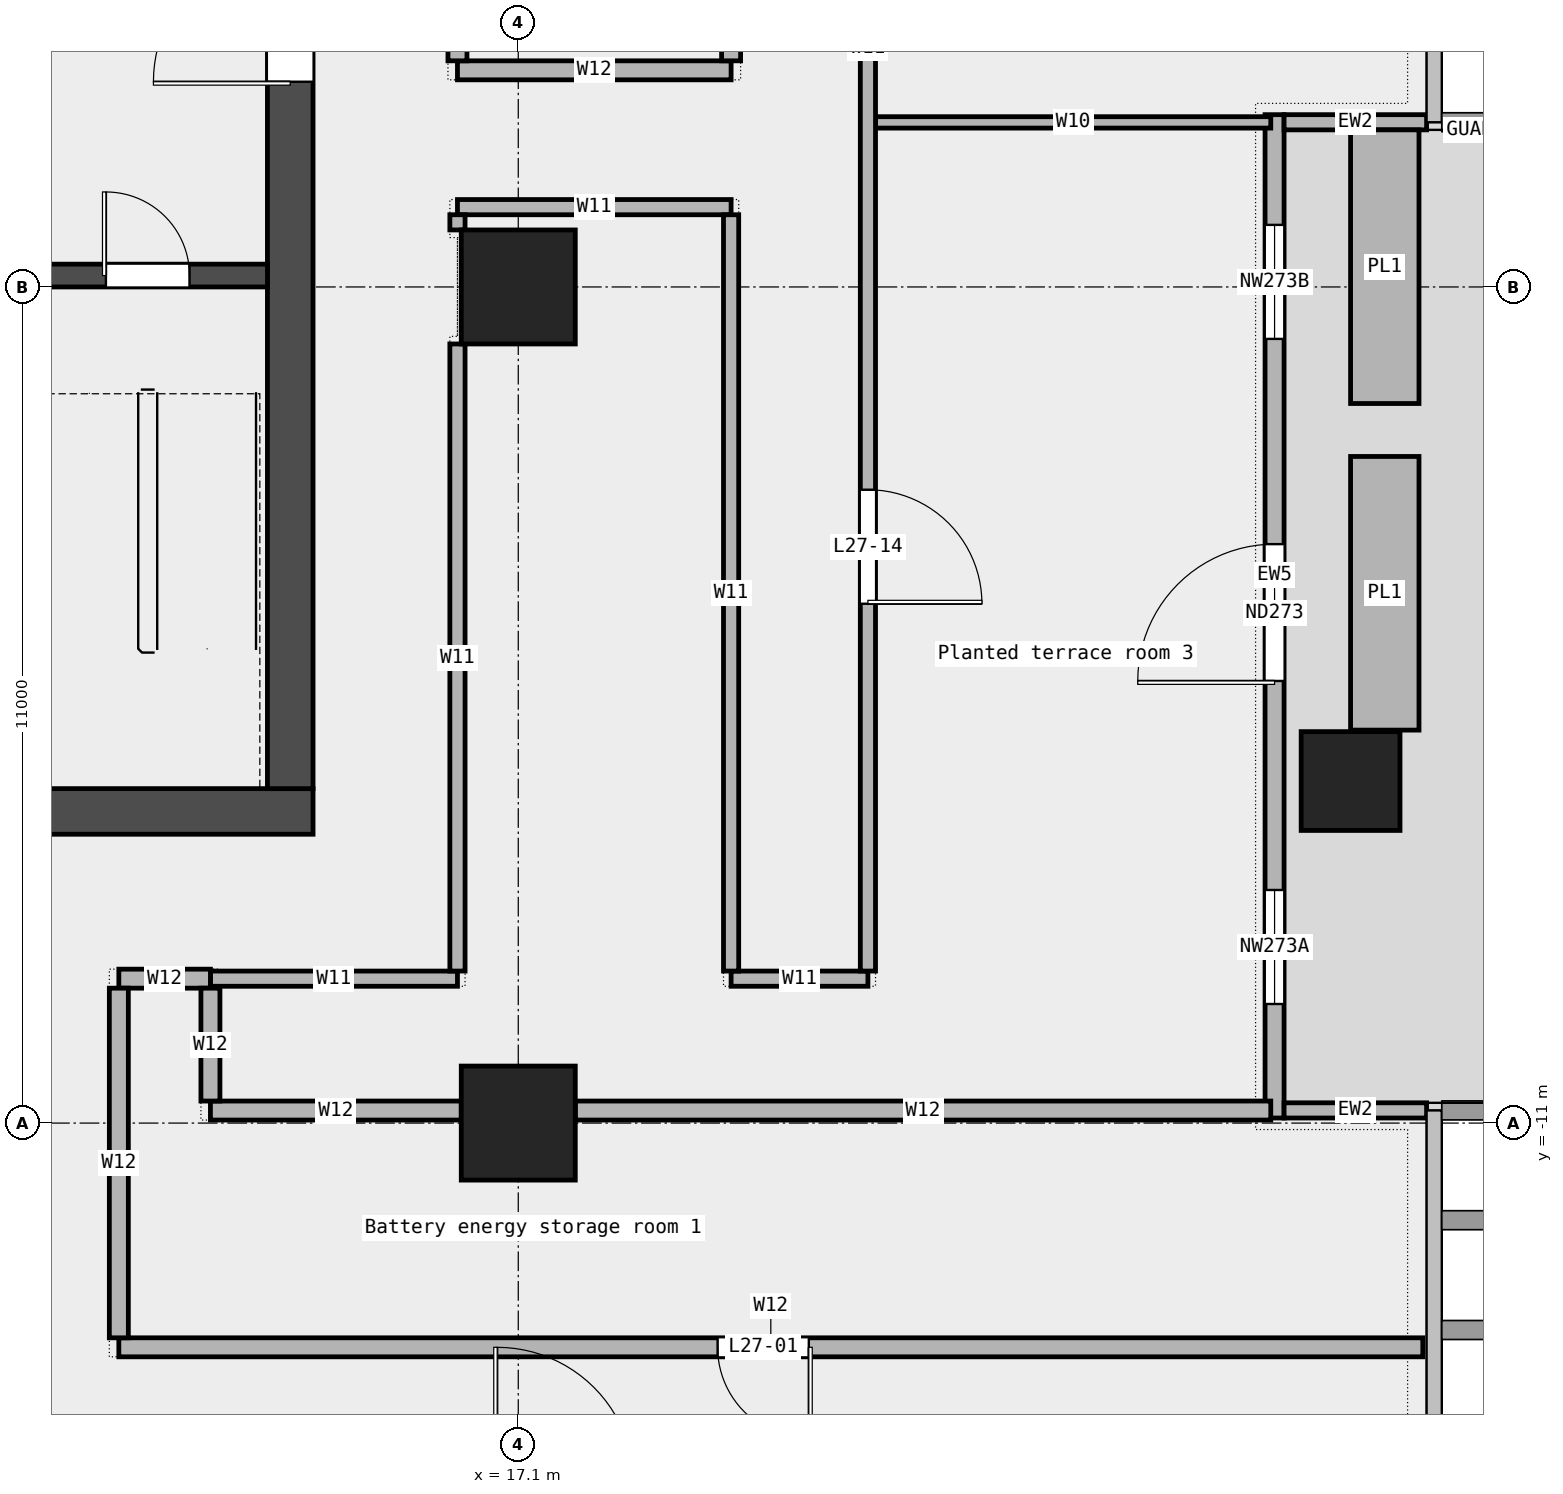
"""IFC4 building model, lengths in metres.
Left out: names, types, materials, properties, quantities, classifications, styles, units other than length and angle.
Written with IfcOpenShell. Run it as: python <this file> out.ifc"""

import sys

from ifc_helpers import new_model, si_unit, direction, frame, frame_2d, origin, origin_2d, place, context, subcontext, project, spatial, rectangle, extrude, element, fill, save


model = new_model("IFC4")
c1 = context("Model", 3, precision=1e-05, world=origin(), true_north=direction((0.0, 1.0)))
c2 = subcontext(c1, "Body", "Model", "MODEL_VIEW")
j1 = project(units=[si_unit("LENGTHUNIT", "METRE"), si_unit("PLANEANGLEUNIT", "RADIAN")], contexts=[c1])
p1 = place(None, origin())
s1 = spatial("IfcSite", under=j1, at=p1, CompositionType="ELEMENT")
p2 = place(p1, origin())
s2 = spatial("IfcBuilding", under=s1, at=p2, CompositionType="ELEMENT")
p3 = place(p2, frame((0.0, 0.0, 135.1)))
s3 = spatial("IfcBuildingStorey", under=s2, at=p3, CompositionType="ELEMENT", Elevation=135.1)
p4 = place(p3, frame((28.05, -6.5, 0.0), z_axis=(0.0, 0.0, 1.0), x_axis=(1.0, 0.0, 0.0)))
e1 = element("IfcColumn", 1, at=p4, inside=s3, PredefinedType="COLUMN", context=c2, shape_type="SweptSolid", body=[
    extrude(rectangle(XDim=1.3, YDim=1.3, at=origin_2d()), origin(), (0.0, 0.0, 1.0), 4.05),
])
for number, where, z_axis, x_axis in (
    (2, (17.1, -11.0, 0.0), (0.0, 0.0, 1.0), (1.0, 0.0, 0.0)),
    (3, (17.1, 0.0, 0.0), (0.0, 0.0, 1.0), (1.0, 0.0, 0.0)),
):
    element("IfcColumn", number, at=place(p3, frame(where, z_axis=z_axis, x_axis=x_axis)), inside=s3, PredefinedType="COLUMN", context=c2, shape_type="SweptSolid", body=[
        extrude(rectangle(XDim=1.5, YDim=1.5, at=origin_2d()), origin(), (0.0, 0.0, 1.0), 4.05),
    ])
p5 = place(p3, frame((27.05, -10.933, 0.0), z_axis=(0.0, 0.0, 1.0), x_axis=(0.0, 1.0, 0.0)))
e4 = element("IfcWall", 4, at=p5, inside=s3, PredefinedType="STANDARD", context=c2, shape_type="SweptSolid", body=[
    extrude(rectangle(XDim=13.2, YDim=0.25, at=frame_2d((6.6, 0.0))), origin(), (0.0, 0.0, 1.0), 4.05),
])
p6 = place(p5, frame((1.5, 0.0, 0.45)))
e5 = element("IfcOpeningElement", 5, at=p6, cuts=e4, PredefinedType="OPENING", context=c2, shape_type="SweptSolid", body=[
    extrude(rectangle(XDim=1.5, YDim=3.0, at=frame_2d((0.75, 1.5))), frame((0.0, 0.137, 0.0), z_axis=(0.0, -1.0, 0.0), x_axis=(1.0, 0.0, 0.0)), (0.0, 0.0, 1.0), 0.274),
])
p7 = place(p5, frame((5.75, 0.0, 0.0)))
e6 = element("IfcOpeningElement", 6, at=p7, cuts=e4, PredefinedType="OPENING", context=c2, shape_type="SweptSolid", body=[
    extrude(rectangle(XDim=1.8, YDim=2.4, at=frame_2d((0.9, 1.2))), frame((0.0, 0.137, 0.0), z_axis=(0.0, -1.0, 0.0), x_axis=(1.0, 0.0, 0.0)), (0.0, 0.0, 1.0), 0.274),
])
p8 = place(p5, frame((10.25, 0.0, 0.45)))
e7 = element("IfcOpeningElement", 7, at=p8, cuts=e4, PredefinedType="OPENING", context=c2, shape_type="SweptSolid", body=[
    extrude(rectangle(XDim=1.5, YDim=3.0, at=frame_2d((0.75, 1.5))), frame((0.0, 0.137, 0.0), z_axis=(0.0, -1.0, 0.0), x_axis=(1.0, 0.0, 0.0)), (0.0, 0.0, 1.0), 0.274),
])
for number, where, z_axis, x_axis in (
    (8, (29.05, -10.833, 0.0), (0.0, 0.0, 1.0), (-1.0, 0.0, 0.0)),
    (9, (29.05, 2.167, 0.0), (0.0, 0.0, 1.0), (-1.0, 0.0, 0.0)),
):
    element("IfcWall", number, at=place(p3, frame(where, z_axis=z_axis, x_axis=x_axis)), inside=s3, PredefinedType="STANDARD", context=c2, shape_type="SweptSolid", body=[
        extrude(rectangle(XDim=1.875, YDim=0.2, at=frame_2d((0.938, 0.0))), origin(), (0.0, 0.0, 1.0), 4.05),
    ])
for number, where, z_axis, x_axis in (
    (10, (28.5, -5.83, 0.0), (0.0, 0.0, 1.0), (0.0, 1.0, 0.0)),
    (11, (28.5, -1.533, 0.0), (0.0, 0.0, 1.0), (0.0, 1.0, 0.0)),
):
    element("IfcWall", number, at=place(p3, frame(where, z_axis=z_axis, x_axis=x_axis)), inside=s3, PredefinedType="STANDARD", context=c2, shape_type="SweptSolid", body=[
        extrude(rectangle(XDim=3.6, YDim=0.9, at=frame_2d((1.8, 0.0))), origin(), (0.0, 0.0, 1.0), 0.7),
    ])
p9 = place(p3, frame((11.845, -13.95, 0.0), z_axis=(0.0, 0.0, 1.0), x_axis=(1.0, 0.0, 0.0)))
e12 = element("IfcWall", 12, at=p9, inside=s3, PredefinedType="PARTITIONING", context=c2, shape_type="SweptSolid", body=[
    extrude(rectangle(XDim=17.155, YDim=0.25, at=frame_2d((8.578, 0.0))), origin(), (0.0, 0.0, 1.0), 4.05),
])
p10 = place(p9, frame((7.877, 0.0, 0.0)))
e13 = element("IfcOpeningElement", 13, at=p10, cuts=e12, PredefinedType="OPENING", context=c2, shape_type="SweptSolid", body=[
    extrude(rectangle(XDim=1.2, YDim=2.1, at=frame_2d((0.6, 1.05))), frame((0.0, 0.137, 0.0), z_axis=(0.0, -1.0, 0.0), x_axis=(1.0, 0.0, 0.0)), (0.0, 0.0, 1.0), 0.274),
])
p11 = place(p3, frame((13.05, -10.835, 0.0), z_axis=(0.0, 0.0, 1.0), x_axis=(1.0, 0.0, 0.0)))
e14 = element("IfcWall", 14, at=p11, inside=s3, PredefinedType="PARTITIONING", context=c2, shape_type="SweptSolid", body=[
    extrude(rectangle(XDim=3.3, YDim=0.25, at=frame_2d((1.65, 0.0))), origin(), (0.0, 0.0, 1.0), 4.05),
])
p12 = place(p3, frame((17.85, -10.835, 0.0), z_axis=(0.0, 0.0, 1.0), x_axis=(1.0, 0.0, 0.0)))
e15 = element("IfcWall", 15, at=p12, inside=s3, PredefinedType="PARTITIONING", context=c2, shape_type="SweptSolid", body=[
    extrude(rectangle(XDim=9.15, YDim=0.25, at=frame_2d((4.575, 0.0))), origin(), (0.0, 0.0, 1.0), 4.05),
])
p13 = place(p3, frame((13.05, -9.1, 0.0), z_axis=(0.0, 0.0, 1.0), x_axis=(1.0, 0.0, 0.0)))
e16 = element("IfcWall", 16, at=p13, inside=s3, PredefinedType="PARTITIONING", context=c2, shape_type="SweptSolid", body=[
    extrude(rectangle(XDim=3.25, YDim=0.2, at=frame_2d((1.625, 0.0))), origin(), (0.0, 0.0, 1.0), 4.05),
])
p14 = place(p3, frame((19.9, -9.1, 0.0), z_axis=(0.0, 0.0, 1.0), x_axis=(1.0, 0.0, 0.0)))
e17 = element("IfcWall", 17, at=p14, inside=s3, PredefinedType="PARTITIONING", context=c2, shape_type="SweptSolid", body=[
    extrude(rectangle(XDim=1.8, YDim=0.2, at=frame_2d((0.9, 0.0))), origin(), (0.0, 0.0, 1.0), 4.05),
])
p15 = place(p3, frame((11.845, -9.1, 0.0), z_axis=(0.0, 0.0, 1.0), x_axis=(1.0, 0.0, 0.0)))
e18 = element("IfcWall", 18, at=p15, inside=s3, PredefinedType="PARTITIONING", context=c2, shape_type="SweptSolid", body=[
    extrude(rectangle(XDim=1.205, YDim=0.25, at=frame_2d((0.603, 0.0))), origin(), (0.0, 0.0, 1.0), 4.05),
])
p16 = place(p3, frame((16.3, 1.05, 0.0), z_axis=(0.0, 0.0, 1.0), x_axis=(1.0, 0.0, 0.0)))
e19 = element("IfcWall", 19, at=p16, inside=s3, PredefinedType="PARTITIONING", context=c2, shape_type="SweptSolid", body=[
    extrude(rectangle(XDim=3.6, YDim=0.2, at=frame_2d((1.8, 0.0))), origin(), (0.0, 0.0, 1.0), 4.05),
])
p17 = place(p3, frame((21.8, 2.165, 0.0), z_axis=(0.0, 0.0, 1.0), x_axis=(1.0, 0.0, 0.0)))
e20 = element("IfcWall", 20, at=p17, inside=s3, PredefinedType="PARTITIONING", context=c2, shape_type="SweptSolid", body=[
    extrude(rectangle(XDim=5.2, YDim=0.15, at=frame_2d((2.6, 0.0))), origin(), (0.0, 0.0, 1.0), 4.05),
])
p18 = place(p3, frame((16.3, 2.85, 0.0), z_axis=(0.0, 0.0, 1.0), x_axis=(1.0, 0.0, 0.0)))
e21 = element("IfcWall", 21, at=p18, inside=s3, PredefinedType="PARTITIONING", context=c2, shape_type="SweptSolid", body=[
    extrude(rectangle(XDim=3.6, YDim=0.25, at=frame_2d((1.8, 0.0))), origin(), (0.0, 0.0, 1.0), 4.05),
])
p19 = place(p3, frame((11.845, -13.825, 0.0), z_axis=(0.0, 0.0, 1.0), x_axis=(0.0, 1.0, 0.0)))
e22 = element("IfcWall", 22, at=p19, inside=s3, PredefinedType="PARTITIONING", context=c2, shape_type="SweptSolid", body=[
    extrude(rectangle(XDim=4.6, YDim=0.25, at=frame_2d((2.3, 0.0))), origin(), (0.0, 0.0, 1.0), 4.05),
])
p20 = place(p3, frame((13.05, -10.71, 0.0), z_axis=(0.0, 0.0, 1.0), x_axis=(0.0, 1.0, 0.0)))
e23 = element("IfcWall", 23, at=p20, inside=s3, PredefinedType="PARTITIONING", context=c2, shape_type="SweptSolid", body=[
    extrude(rectangle(XDim=1.485, YDim=0.25, at=frame_2d((0.742, 0.0))), origin(), (0.0, 0.0, 1.0), 4.05),
])
p21 = place(p3, frame((16.3, -9.0, 0.0), z_axis=(0.0, 0.0, 1.0), x_axis=(0.0, 1.0, 0.0)))
e24 = element("IfcWall", 24, at=p21, inside=s3, PredefinedType="PARTITIONING", context=c2, shape_type="SweptSolid", body=[
    extrude(rectangle(XDim=8.25, YDim=0.2, at=frame_2d((4.125, 0.0))), origin(), (0.0, 0.0, 1.0), 4.05),
])
p22 = place(p3, frame((16.3, 0.75, 0.0), z_axis=(0.0, 0.0, 1.0), x_axis=(0.0, 1.0, 0.0)))
e25 = element("IfcWall", 25, at=p22, inside=s3, PredefinedType="PARTITIONING", context=c2, shape_type="SweptSolid", body=[
    extrude(rectangle(XDim=0.2, YDim=0.2, at=frame_2d((0.1, 0.0))), origin(), (0.0, 0.0, 1.0), 4.05),
])
p23 = place(p3, frame((16.3, 2.975, 0.0), z_axis=(0.0, 0.0, 1.0), x_axis=(0.0, 1.0, 0.0)))
e26 = element("IfcWall", 26, at=p23, inside=s3, PredefinedType="PARTITIONING", context=c2, shape_type="SweptSolid", body=[
    extrude(rectangle(XDim=7.275, YDim=0.25, at=frame_2d((3.637, 0.0))), origin(), (0.0, 0.0, 1.0), 4.05),
])
p24 = place(p3, frame((19.9, -9.0, 0.0), z_axis=(0.0, 0.0, 1.0), x_axis=(0.0, 1.0, 0.0)))
e27 = element("IfcWall", 27, at=p24, inside=s3, PredefinedType="PARTITIONING", context=c2, shape_type="SweptSolid", body=[
    extrude(rectangle(XDim=9.95, YDim=0.2, at=frame_2d((4.975, 0.0))), origin(), (0.0, 0.0, 1.0), 4.05),
])
p25 = place(p3, frame((19.9, 2.975, 0.0), z_axis=(0.0, 0.0, 1.0), x_axis=(0.0, 1.0, 0.0)))
e28 = element("IfcWall", 28, at=p25, inside=s3, PredefinedType="PARTITIONING", context=c2, shape_type="SweptSolid", body=[
    extrude(rectangle(XDim=12.3, YDim=0.25, at=frame_2d((6.15, 0.0))), origin(), (0.0, 0.0, 1.0), 4.05),
])
p26 = place(p25, frame((8.775, 0.0, 0.0)))
e29 = element("IfcOpeningElement", 29, at=p26, cuts=e28, PredefinedType="OPENING", context=c2, shape_type="SweptSolid", body=[
    extrude(rectangle(XDim=0.9, YDim=2.1, at=frame_2d((0.45, 1.05))), frame((0.0, 0.137, 0.0), z_axis=(0.0, -1.0, 0.0), x_axis=(1.0, 0.0, 0.0)), (0.0, 0.0, 1.0), 0.274),
])
p27 = place(p25, frame((2.625, 0.0, 0.0)))
e30 = element("IfcOpeningElement", 30, at=p27, cuts=e28, PredefinedType="OPENING", context=c2, shape_type="SweptSolid", body=[
    extrude(rectangle(XDim=0.9, YDim=2.1, at=frame_2d((0.45, 1.05))), frame((0.0, 0.137, 0.0), z_axis=(0.0, -1.0, 0.0), x_axis=(1.0, 0.0, 0.0)), (0.0, 0.0, 1.0), 0.274),
])
p28 = place(p3, frame((21.7, -9.0, 0.0), z_axis=(0.0, 0.0, 1.0), x_axis=(0.0, 1.0, 0.0)))
e31 = element("IfcWall", 31, at=p28, inside=s3, PredefinedType="PARTITIONING", context=c2, shape_type="SweptSolid", body=[
    extrude(rectangle(XDim=24.3, YDim=0.2, at=frame_2d((12.15, 0.0))), origin(), (0.0, 0.0, 1.0), 4.05),
])
p29 = place(p28, frame((18.645, 0.0, 0.0)))
e32 = element("IfcOpeningElement", 32, at=p29, cuts=e31, PredefinedType="OPENING", context=c2, shape_type="SweptSolid", body=[
    extrude(rectangle(XDim=1.2, YDim=2.1, at=frame_2d((0.6, 1.05))), frame((0.0, 0.112, 0.0), z_axis=(0.0, -1.0, 0.0), x_axis=(1.0, 0.0, 0.0)), (0.0, 0.0, 1.0), 0.224),
])
p30 = place(p28, frame((4.833, 0.0, 0.0)))
e33 = element("IfcOpeningElement", 33, at=p30, cuts=e31, PredefinedType="OPENING", context=c2, shape_type="SweptSolid", body=[
    extrude(rectangle(XDim=1.5, YDim=2.1, at=frame_2d((0.75, 1.05))), frame((0.0, 0.112, 0.0), z_axis=(0.0, -1.0, 0.0), x_axis=(1.0, 0.0, 0.0)), (0.0, 0.0, 1.0), 0.224),
])
p31 = place(p28, frame((12.228, 0.0, 0.0)))
e34 = element("IfcOpeningElement", 34, at=p31, cuts=e31, PredefinedType="OPENING", context=c2, shape_type="SweptSolid", body=[
    extrude(rectangle(XDim=0.9, YDim=2.1, at=frame_2d((0.45, 1.05))), frame((0.0, 0.112, 0.0), z_axis=(0.0, -1.0, 0.0), x_axis=(1.0, 0.0, 0.0)), (0.0, 0.0, 1.0), 0.224),
])
p32 = place(p3, frame((-14.4, -6.9, 0.0), z_axis=(0.0, 0.0, 1.0), x_axis=(1.0, 0.0, 0.0)))
e35 = element("IfcWall", 35, at=p32, inside=s3, PredefinedType="SHEAR", context=c2, shape_type="SweptSolid", body=[
    extrude(rectangle(XDim=28.8, YDim=0.6, at=frame_2d((14.4, 0.0))), origin(), (0.0, 0.0, 1.0), 4.2),
])
p33 = place(p32, frame((4.9, 0.0, 0.0)))
e36 = element("IfcOpeningElement", 36, at=p33, cuts=e35, PredefinedType="OPENING", context=c2, shape_type="SweptSolid", body=[
    extrude(rectangle(XDim=1.0, YDim=2.1, at=frame_2d((0.5, 1.05))), frame((0.0, 0.312, 0.0), z_axis=(0.0, -1.0, 0.0), x_axis=(1.0, 0.0, 0.0)), (0.0, 0.0, 1.0), 0.624),
])
p34 = place(p32, frame((9.3, 0.0, 0.0)))
e37 = element("IfcOpeningElement", 37, at=p34, cuts=e35, PredefinedType="OPENING", context=c2, shape_type="SweptSolid", body=[
    extrude(rectangle(XDim=1.2, YDim=2.1, at=frame_2d((0.6, 1.05))), frame((0.0, 0.312, 0.0), z_axis=(0.0, -1.0, 0.0), x_axis=(1.0, 0.0, 0.0)), (0.0, 0.0, 1.0), 0.624),
])
p35 = place(p32, frame((14.462, 0.0, 0.0)))
e38 = element("IfcOpeningElement", 38, at=p35, cuts=e35, PredefinedType="OPENING", context=c2, shape_type="SweptSolid", body=[
    extrude(rectangle(XDim=1.0, YDim=2.1, at=frame_2d((0.5, 1.05))), frame((0.0, 0.312, 0.0), z_axis=(0.0, -1.0, 0.0), x_axis=(1.0, 0.0, 0.0)), (0.0, 0.0, 1.0), 0.624),
])
p36 = place(p32, frame((18.75, 0.0, 0.0)))
e39 = element("IfcOpeningElement", 39, at=p36, cuts=e35, PredefinedType="OPENING", context=c2, shape_type="SweptSolid", body=[
    extrude(rectangle(XDim=1.8, YDim=2.1, at=frame_2d((0.9, 1.05))), frame((0.0, 0.312, 0.0), z_axis=(0.0, -1.0, 0.0), x_axis=(1.0, 0.0, 0.0)), (0.0, 0.0, 1.0), 0.624),
])
p37 = place(p32, frame((23.087, 0.0, 0.0)))
e40 = element("IfcOpeningElement", 40, at=p37, cuts=e35, PredefinedType="OPENING", context=c2, shape_type="SweptSolid", body=[
    extrude(rectangle(XDim=1.0, YDim=2.1, at=frame_2d((0.5, 1.05))), frame((0.0, 0.312, 0.0), z_axis=(0.0, -1.0, 0.0), x_axis=(1.0, 0.0, 0.0)), (0.0, 0.0, 1.0), 0.624),
])
p38 = place(p3, frame((14.1, -6.6, 0.0), z_axis=(0.0, 0.0, 1.0), x_axis=(0.0, 1.0, 0.0)))
e41 = element("IfcWall", 41, at=p38, inside=s3, PredefinedType="SHEAR", context=c2, shape_type="SweptSolid", body=[
    extrude(rectangle(XDim=19.5, YDim=0.6, at=frame_2d((9.75, 0.0))), origin(), (0.0, 0.0, 1.0), 4.2),
])
p39 = place(p38, frame((9.3, 0.0, 0.0)))
e42 = element("IfcOpeningElement", 42, at=p39, cuts=e41, PredefinedType="OPENING", context=c2, shape_type="SweptSolid", body=[
    extrude(rectangle(XDim=1.8, YDim=2.1, at=frame_2d((0.9, 1.05))), frame((0.0, 0.312, 0.0), z_axis=(0.0, -1.0, 0.0), x_axis=(1.0, 0.0, 0.0)), (0.0, 0.0, 1.0), 0.624),
])
p40 = place(p3, frame((10.65, 0.15, 0.0), z_axis=(0.0, 0.0, 1.0), x_axis=(1.0, 0.0, 0.0)))
e43 = element("IfcWall", 43, at=p40, inside=s3, PredefinedType="SOLIDWALL", context=c2, shape_type="SweptSolid", body=[
    extrude(rectangle(XDim=3.15, YDim=0.3, at=frame_2d((1.575, 0.0))), origin(), (0.0, 0.0, 1.0), 4.2),
])
p41 = place(p40, frame((1.025, 0.0, 0.0)))
e44 = element("IfcOpeningElement", 44, at=p41, cuts=e43, PredefinedType="OPENING", context=c2, shape_type="SweptSolid", body=[
    extrude(rectangle(XDim=1.1, YDim=2.1, at=frame_2d((0.55, 1.05))), frame((0.0, 0.162, 0.0), z_axis=(0.0, -1.0, 0.0), x_axis=(1.0, 0.0, 0.0)), (0.0, 0.0, 1.0), 0.324),
])
p42 = place(p6, origin())
e45 = element("IfcWindow", 45, at=p42, inside=s3, PartitioningType="SINGLE_PANEL", PredefinedType="WINDOW", context=c2, shape_type="SweptSolid", body=[
    extrude(rectangle(XDim=1.5, YDim=3.0, at=frame_2d((0.75, 1.5))), frame((0.0, 0.03, 0.0), z_axis=(0.0, -1.0, 0.0), x_axis=(1.0, 0.0, 0.0)), (0.0, 0.0, 1.0), 0.06),
])
fill(e5, e45)
p43 = place(p7, origin())
e46 = element("IfcDoor", 46, at=p43, inside=s3, OperationType="DOUBLE_DOOR_SINGLE_SWING", PredefinedType="DOOR", context=c2, shape_type="SweptSolid", body=[
    extrude(rectangle(XDim=1.8, YDim=2.4, at=frame_2d((0.9, 1.2))), frame((0.0, 0.025, 0.0), z_axis=(0.0, -1.0, 0.0), x_axis=(1.0, 0.0, 0.0)), (0.0, 0.0, 1.0), 0.05),
])
fill(e6, e46)
p44 = place(p8, origin())
e47 = element("IfcWindow", 47, at=p44, inside=s3, PartitioningType="SINGLE_PANEL", PredefinedType="WINDOW", context=c2, shape_type="SweptSolid", body=[
    extrude(rectangle(XDim=1.5, YDim=3.0, at=frame_2d((0.75, 1.5))), frame((0.0, 0.03, 0.0), z_axis=(0.0, -1.0, 0.0), x_axis=(1.0, 0.0, 0.0)), (0.0, 0.0, 1.0), 0.06),
])
fill(e7, e47)
p45 = place(p10, origin())
e48 = element("IfcDoor", 48, at=p45, inside=s3, OperationType="SINGLE_SWING_LEFT", PredefinedType="DOOR", context=c2, shape_type="SweptSolid", body=[
    extrude(rectangle(XDim=1.2, YDim=2.1, at=frame_2d((0.6, 1.05))), frame((0.0, 0.025, 0.0), z_axis=(0.0, -1.0, 0.0), x_axis=(1.0, 0.0, 0.0)), (0.0, 0.0, 1.0), 0.05),
])
fill(e13, e48)
p46 = place(p30, origin())
e49 = element("IfcDoor", 49, at=p46, inside=s3, OperationType="DOUBLE_DOOR_SINGLE_SWING", PredefinedType="DOOR", context=c2, shape_type="SweptSolid", body=[
    extrude(rectangle(XDim=1.5, YDim=2.1, at=frame_2d((0.75, 1.05))), frame((0.0, 0.025, 0.0), z_axis=(0.0, -1.0, 0.0), x_axis=(1.0, 0.0, 0.0)), (0.0, 0.0, 1.0), 0.05),
])
fill(e33, e49)
p47 = place(p41, origin())
e50 = element("IfcDoor", 50, at=p47, inside=s3, OperationType="SINGLE_SWING_RIGHT", PredefinedType="DOOR", context=c2, shape_type="SweptSolid", body=[
    extrude(rectangle(XDim=1.1, YDim=2.1, at=frame_2d((0.55, 1.05))), frame((0.0, 0.025, 0.0), z_axis=(0.0, -1.0, 0.0), x_axis=(1.0, 0.0, 0.0)), (0.0, 0.0, 1.0), 0.05),
])
fill(e44, e50)
p48 = place(p39, origin())
e51 = element("IfcDoor", 51, at=p48, inside=s3, OperationType="DOUBLE_DOOR_SINGLE_SWING", PredefinedType="DOOR", context=c2, shape_type="SweptSolid", body=[
    extrude(rectangle(XDim=1.8, YDim=2.1, at=frame_2d((0.9, 1.05))), frame((0.0, 0.025, 0.0), z_axis=(0.0, -1.0, 0.0), x_axis=(1.0, 0.0, 0.0)), (0.0, 0.0, 1.0), 0.05),
])
fill(e42, e51)
save(model, sys.argv[1])
